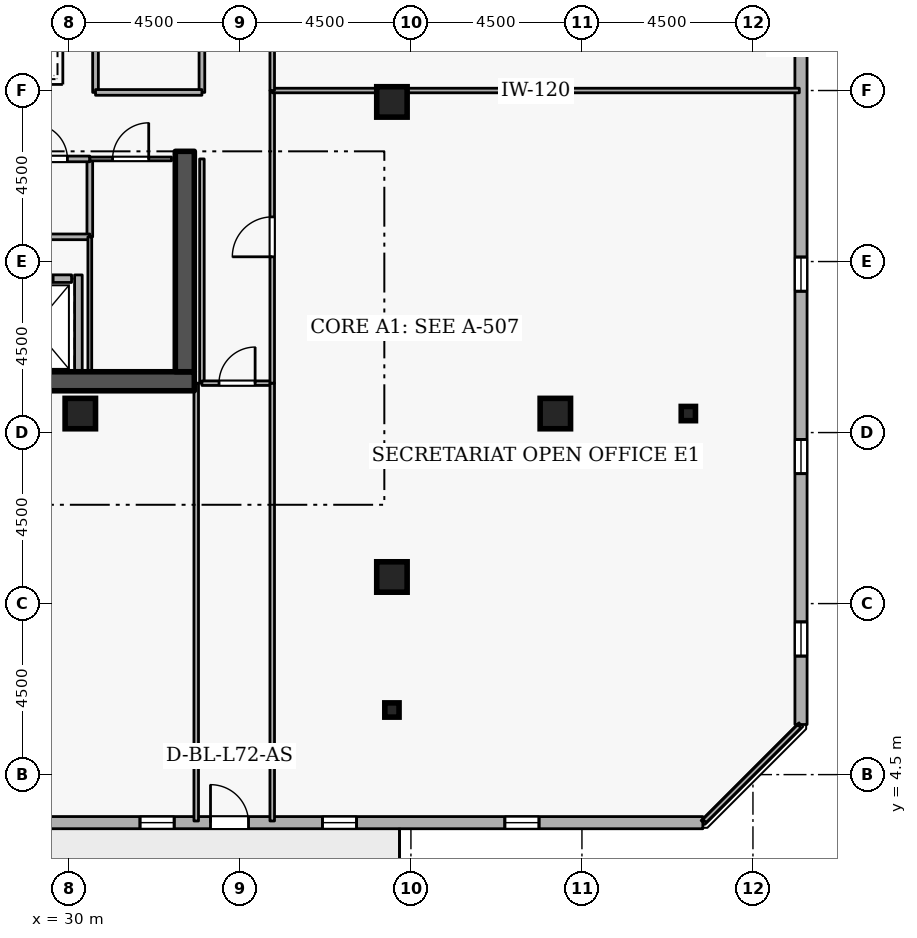
"""IFC4 building model, lengths in metres.
Left out: names, types, materials, properties, quantities, classifications, styles, units other than length and angle.
Written with IfcOpenShell. Run it as: python <this file> out.ifc"""

import sys

from ifc_helpers import new_model, si_unit, direction, frame, frame_2d, origin, origin_2d, place, context, subcontext, project, spatial, rectangle, i_section, extrude, element, fill, save


model = new_model("IFC4")
c1 = context("Model", 3, precision=1e-05, world=origin(), true_north=direction((0.0, 1.0)))
c2 = subcontext(c1, "Body", "Model", "MODEL_VIEW")
j1 = project(units=[si_unit("LENGTHUNIT", "METRE"), si_unit("PLANEANGLEUNIT", "RADIAN")], contexts=[c1])
p1 = place(None, origin())
s1 = spatial("IfcSite", under=j1, at=p1, CompositionType="ELEMENT")
p2 = place(p1, origin())
s2 = spatial("IfcBuilding", under=s1, at=p2, CompositionType="ELEMENT")
p3 = place(p2, frame((0.0, 0.0, 269.1)))
s3 = spatial("IfcBuildingStorey", under=s2, at=p3, CompositionType="ELEMENT", Elevation=269.1)
p4 = place(p3, frame((17.7, 14.85, 0.0), z_axis=(0.0, 0.0, 1.0), x_axis=(1.0, 0.0, 0.0)))
e1 = element("IfcWall", 1, at=p4, inside=s3, PredefinedType="SHEAR", context=c2, shape_type="SweptSolid", body=[
    extrude(rectangle(XDim=15.6, YDim=0.5, at=frame_2d((7.8, 0.0))), origin(), (0.0, 0.0, 1.0), 3.6),
])
p5 = place(p3, frame((33.05, 15.1, 0.0), z_axis=(0.0, 0.0, 1.0), x_axis=(0.0, 1.0, 0.0)))
e2 = element("IfcWall", 2, at=p5, inside=s3, PredefinedType="SHEAR", context=c2, shape_type="SweptSolid", body=[
    extrude(rectangle(XDim=5.8, YDim=0.5, at=frame_2d((2.9, 0.0))), origin(), (0.0, 0.0, 1.0), 3.6),
])
for number, where, z_axis, x_axis in (
    (3, (38.5, 9.7, 0.0), (0.0, 0.0, 1.0), (1.0, 0.0, 0.0)),
    (4, (42.8, 14.0, 0.0), (0.0, 0.0, 1.0), (1.0, 0.0, 0.0)),
    (5, (38.5, 22.2, 0.0), (0.0, 0.0, 1.0), (1.0, 0.0, 0.0)),
    (6, (30.3, 14.0, 0.0), (0.0, 0.0, 1.0), (1.0, 0.0, 0.0)),
):
    element("IfcColumn", number, at=place(p3, frame(where, z_axis=z_axis, x_axis=x_axis)), inside=s3, PredefinedType="COLUMN", context=c2, shape_type="SweptSolid", body=[
        extrude(rectangle(XDim=0.8, YDim=0.8, at=origin_2d()), origin(), (0.0, 0.0, 1.0), 3.6),
    ])
for number, where, z_axis, x_axis in (
    (7, (38.5, 6.2, 0.0), (0.0, 0.0, 1.0), (1.0, 0.0, 0.0)),
    (8, (46.3, 14.0, 0.0), (0.0, 0.0, 1.0), (1.0, 0.0, 0.0)),
):
    element("IfcColumn", number, at=place(p3, frame(where, z_axis=z_axis, x_axis=x_axis)), inside=s3, PredefinedType="COLUMN", context=c2, shape_type="SweptSolid", body=[
        extrude(i_section(OverallWidth=0.375, OverallDepth=0.375, WebThickness=0.017, FlangeThickness=0.027, FilletRadius=0.015, at=origin_2d()), origin(), (0.0, 0.0, 1.0), 3.6),
    ])
p6 = place(p3, frame((10.871, 3.237, 0.0), z_axis=(0.0, 0.0, 1.0), x_axis=(0.999999998513, -5.4540124e-05, 0.0)))
e9 = element("IfcWall", 9, at=p6, inside=s3, PredefinedType="STANDARD", context=c2, shape_type="SweptSolid", body=[
    extrude(rectangle(XDim=35.811, YDim=0.32, at=frame_2d((17.905, 0.0))), origin(), (0.0, 0.0, 1.0), 2.7),
])
p7 = place(p6, frame((22.855, 0.0, 0.0)))
e10 = element("IfcOpeningElement", 10, at=p7, cuts=e9, PredefinedType="OPENING", context=c2, shape_type="SweptSolid", body=[
    extrude(rectangle(XDim=1.0, YDim=2.08, at=frame_2d((0.5, 1.04))), frame((0.0, 0.17, 0.0), z_axis=(0.0, -1.0, 0.0), x_axis=(1.0, 0.0, 0.0)), (0.0, 0.0, 1.0), 0.34),
])
p8 = place(p6, frame((1.8, 0.0, 0.72)))
e11 = element("IfcOpeningElement", 11, at=p8, cuts=e9, PredefinedType="OPENING", context=c2, shape_type="SweptSolid", body=[
    extrude(rectangle(XDim=0.9, YDim=1.75, at=frame_2d((0.45, 0.875))), frame((0.0, 0.17, 0.0), z_axis=(0.0, -1.0, 0.0), x_axis=(1.0, 0.0, 0.0)), (0.0, 0.0, 1.0), 0.34),
])
p9 = place(p6, frame((6.6, 0.0, 0.72)))
e12 = element("IfcOpeningElement", 12, at=p9, cuts=e9, PredefinedType="OPENING", context=c2, shape_type="SweptSolid", body=[
    extrude(rectangle(XDim=0.9, YDim=1.75, at=frame_2d((0.45, 0.875))), frame((0.0, 0.17, 0.0), z_axis=(0.0, -1.0, 0.0), x_axis=(1.0, 0.0, 0.0)), (0.0, 0.0, 1.0), 0.34),
])
p10 = place(p6, frame((11.4, 0.0, 0.72)))
e13 = element("IfcOpeningElement", 13, at=p10, cuts=e9, PredefinedType="OPENING", context=c2, shape_type="SweptSolid", body=[
    extrude(rectangle(XDim=0.9, YDim=1.75, at=frame_2d((0.45, 0.875))), frame((0.0, 0.17, 0.0), z_axis=(0.0, -1.0, 0.0), x_axis=(1.0, 0.0, 0.0)), (0.0, 0.0, 1.0), 0.34),
])
p11 = place(p6, frame((16.2, 0.0, 0.72)))
e14 = element("IfcOpeningElement", 14, at=p11, cuts=e9, PredefinedType="OPENING", context=c2, shape_type="SweptSolid", body=[
    extrude(rectangle(XDim=0.9, YDim=1.75, at=frame_2d((0.45, 0.875))), frame((0.0, 0.17, 0.0), z_axis=(0.0, -1.0, 0.0), x_axis=(1.0, 0.0, 0.0)), (0.0, 0.0, 1.0), 0.34),
])
p12 = place(p6, frame((21.0, 0.0, 0.72)))
e15 = element("IfcOpeningElement", 15, at=p12, cuts=e9, PredefinedType="OPENING", context=c2, shape_type="SweptSolid", body=[
    extrude(rectangle(XDim=0.9, YDim=1.75, at=frame_2d((0.45, 0.875))), frame((0.0, 0.17, 0.0), z_axis=(0.0, -1.0, 0.0), x_axis=(1.0, 0.0, 0.0)), (0.0, 0.0, 1.0), 0.34),
])
p13 = place(p6, frame((25.8, 0.0, 0.72)))
e16 = element("IfcOpeningElement", 16, at=p13, cuts=e9, PredefinedType="OPENING", context=c2, shape_type="SweptSolid", body=[
    extrude(rectangle(XDim=0.9, YDim=1.75, at=frame_2d((0.45, 0.875))), frame((0.0, 0.17, 0.0), z_axis=(0.0, -1.0, 0.0), x_axis=(1.0, 0.0, 0.0)), (0.0, 0.0, 1.0), 0.34),
])
p14 = place(p6, frame((30.6, 0.0, 0.72)))
e17 = element("IfcOpeningElement", 17, at=p14, cuts=e9, PredefinedType="OPENING", context=c2, shape_type="SweptSolid", body=[
    extrude(rectangle(XDim=0.9, YDim=1.75, at=frame_2d((0.45, 0.875))), frame((0.0, 0.17, 0.0), z_axis=(0.0, -1.0, 0.0), x_axis=(1.0, 0.0, 0.0)), (0.0, 0.0, 1.0), 0.34),
])
p15 = place(p3, frame((49.265, 5.819, 0.0), z_axis=(0.0, 0.0, 1.0), x_axis=(-5.4540124e-05, 0.999999998513, 0.0)))
e18 = element("IfcWall", 18, at=p15, inside=s3, PredefinedType="STANDARD", context=c2, shape_type="SweptSolid", body=[
    extrude(rectangle(XDim=35.811, YDim=0.32, at=frame_2d((17.905, 0.0))), origin(), (0.0, 0.0, 1.0), 2.7),
])
p16 = place(p15, frame((1.8, 0.0, 0.72)))
e19 = element("IfcOpeningElement", 19, at=p16, cuts=e18, PredefinedType="OPENING", context=c2, shape_type="SweptSolid", body=[
    extrude(rectangle(XDim=0.9, YDim=1.75, at=frame_2d((0.45, 0.875))), frame((0.0, 0.17, 0.0), z_axis=(0.0, -1.0, 0.0), x_axis=(1.0, 0.0, 0.0)), (0.0, 0.0, 1.0), 0.34),
])
p17 = place(p15, frame((6.6, 0.0, 0.72)))
e20 = element("IfcOpeningElement", 20, at=p17, cuts=e18, PredefinedType="OPENING", context=c2, shape_type="SweptSolid", body=[
    extrude(rectangle(XDim=0.9, YDim=1.75, at=frame_2d((0.45, 0.875))), frame((0.0, 0.17, 0.0), z_axis=(0.0, -1.0, 0.0), x_axis=(1.0, 0.0, 0.0)), (0.0, 0.0, 1.0), 0.34),
])
p18 = place(p15, frame((11.4, 0.0, 0.72)))
e21 = element("IfcOpeningElement", 21, at=p18, cuts=e18, PredefinedType="OPENING", context=c2, shape_type="SweptSolid", body=[
    extrude(rectangle(XDim=0.9, YDim=1.75, at=frame_2d((0.45, 0.875))), frame((0.0, 0.17, 0.0), z_axis=(0.0, -1.0, 0.0), x_axis=(1.0, 0.0, 0.0)), (0.0, 0.0, 1.0), 0.34),
])
p19 = place(p15, frame((21.0, 0.0, 0.72)))
e22 = element("IfcOpeningElement", 22, at=p19, cuts=e18, PredefinedType="OPENING", context=c2, shape_type="SweptSolid", body=[
    extrude(rectangle(XDim=0.9, YDim=1.75, at=frame_2d((0.45, 0.875))), frame((0.0, 0.17, 0.0), z_axis=(0.0, -1.0, 0.0), x_axis=(1.0, 0.0, 0.0)), (0.0, 0.0, 1.0), 0.34),
])
p20 = place(p15, frame((25.8, 0.0, 0.72)))
e23 = element("IfcOpeningElement", 23, at=p20, cuts=e18, PredefinedType="OPENING", context=c2, shape_type="SweptSolid", body=[
    extrude(rectangle(XDim=0.9, YDim=1.75, at=frame_2d((0.45, 0.875))), frame((0.0, 0.17, 0.0), z_axis=(0.0, -1.0, 0.0), x_axis=(1.0, 0.0, 0.0)), (0.0, 0.0, 1.0), 0.34),
])
p21 = place(p15, frame((30.6, 0.0, 0.72)))
e24 = element("IfcOpeningElement", 24, at=p21, cuts=e18, PredefinedType="OPENING", context=c2, shape_type="SweptSolid", body=[
    extrude(rectangle(XDim=0.9, YDim=1.75, at=frame_2d((0.45, 0.875))), frame((0.0, 0.17, 0.0), z_axis=(0.0, -1.0, 0.0), x_axis=(1.0, 0.0, 0.0)), (0.0, 0.0, 1.0), 0.34),
])
p22 = place(p3, frame((28.08, 17.55, 0.0), z_axis=(0.0, 0.0, 1.0), x_axis=(1.0, 0.0, 0.0)))
e25 = element("IfcWall", 25, at=p22, inside=s3, PredefinedType="STANDARD", context=c2, shape_type="SweptSolid", body=[
    extrude(rectangle(XDim=1.99, YDim=0.2, at=frame_2d((0.995, 0.0))), origin(), (0.0, 0.0, 1.0), 3.34),
])
p23 = place(p22, frame((0.485, 0.0, 0.0)))
e26 = element("IfcOpeningElement", 26, at=p23, cuts=e25, PredefinedType="OPENING", context=c2, shape_type="SweptSolid", body=[
    extrude(rectangle(XDim=1.02, YDim=2.06, at=frame_2d((0.51, 1.03))), frame((0.0, 0.11, 0.0), z_axis=(0.0, -1.0, 0.0), x_axis=(1.0, 0.0, 0.0)), (0.0, 0.0, 1.0), 0.22),
])
p24 = place(p3, frame((30.25, 15.112, 0.0), z_axis=(0.0, 0.0, 1.0), x_axis=(0.0, 1.0, 0.0)))
e27 = element("IfcWall", 27, at=p24, inside=s3, PredefinedType="STANDARD", context=c2, shape_type="SweptSolid", body=[
    extrude(rectangle(XDim=2.536, YDim=0.2, at=frame_2d((1.268, 0.0))), origin(), (0.0, 0.0, 1.0), 3.34),
])
p25 = place(p3, frame((30.55, 20.7, 0.0), z_axis=(0.0, 0.0, 1.0), x_axis=(0.0, -1.0, 0.0)))
e28 = element("IfcWall", 28, at=p25, inside=s3, PredefinedType="PARTITIONING", context=c2, shape_type="SweptSolid", body=[
    extrude(rectangle(XDim=2.05, YDim=0.15, at=frame_2d((1.025, 0.0))), origin(), (0.0, 0.0, 1.0), 3.34),
])
p26 = place(p3, frame((30.55, 18.65, 0.0), z_axis=(0.0, 0.0, 1.0), x_axis=(-1.0, 0.0, 0.0)))
e29 = element("IfcWall", 29, at=p26, inside=s3, PredefinedType="PARTITIONING", context=c2, shape_type="SweptSolid", body=[
    extrude(rectangle(XDim=2.1, YDim=0.15, at=frame_2d((1.05, 0.0))), origin(), (0.0, 0.0, 1.0), 3.34),
])
p27 = place(p3, frame((28.45, 20.7, 0.0), z_axis=(0.0, 0.0, 1.0), x_axis=(1.0, 0.0, 0.0)))
e30 = element("IfcWall", 30, at=p27, inside=s3, PredefinedType="PARTITIONING", context=c2, shape_type="SweptSolid", body=[
    extrude(rectangle(XDim=2.1, YDim=0.15, at=frame_2d((1.05, 0.0))), origin(), (0.0, 0.0, 1.0), 3.34),
])
p28 = place(p27, frame((0.59, 0.0, 0.0)))
e31 = element("IfcOpeningElement", 31, at=p28, cuts=e30, PredefinedType="OPENING", context=c2, shape_type="SweptSolid", body=[
    extrude(rectangle(XDim=0.92, YDim=2.08, at=frame_2d((0.46, 1.04))), frame((0.0, 0.085, 0.0), z_axis=(0.0, -1.0, 0.0), x_axis=(1.0, 0.0, 0.0)), (0.0, 0.0, 1.0), 0.17),
])
p29 = place(p3, frame((30.55, 15.1, 0.0), z_axis=(0.0, 0.0, 1.0), x_axis=(0.0, 1.0, 0.0)))
e32 = element("IfcWall", 32, at=p29, inside=s3, PredefinedType="PARTITIONING", context=c2, shape_type="SweptSolid", body=[
    extrude(rectangle(XDim=3.55, YDim=0.1, at=frame_2d((1.775, 0.0))), origin(), (0.0, 0.0, 1.0), 3.34),
])
p30 = place(p3, frame((30.55, 20.7, 0.0), z_axis=(0.0, 0.0, 1.0), x_axis=(1.0, 0.0, 0.0)))
e33 = element("IfcWall", 33, at=p30, inside=s3, PredefinedType="PARTITIONING", context=c2, shape_type="SweptSolid", body=[
    extrude(rectangle(XDim=2.15, YDim=0.1, at=frame_2d((1.075, 0.0))), origin(), (0.0, 0.0, 1.0), 3.34),
])
p31 = place(p30, frame((0.6, 0.0, 0.0)))
e34 = element("IfcOpeningElement", 34, at=p31, cuts=e33, PredefinedType="OPENING", context=c2, shape_type="SweptSolid", body=[
    extrude(rectangle(XDim=0.95, YDim=2.1, at=frame_2d((0.475, 1.05))), frame((0.0, 0.06, 0.0), z_axis=(0.0, -1.0, 0.0), x_axis=(1.0, 0.0, 0.0)), (0.0, 0.0, 1.0), 0.12),
])
p32 = place(p3, frame((33.5, 20.7, 0.0), z_axis=(0.0, 0.0, 1.0), x_axis=(0.0, -1.0, 0.0)))
e35 = element("IfcWall", 35, at=p32, inside=s3, PredefinedType="PARTITIONING", context=c2, shape_type="SweptSolid", body=[
    extrude(rectangle(XDim=5.9, YDim=0.12, at=frame_2d((2.95, 0.0))), origin(), (0.0, 0.0, 1.0), 3.34),
])
p33 = place(p3, frame((33.5, 14.8, 0.0), z_axis=(0.0, 0.0, 1.0), x_axis=(1.0, 0.0, 0.0)))
e36 = element("IfcWall", 36, at=p33, inside=s3, PredefinedType="PARTITIONING", context=c2, shape_type="SweptSolid", body=[
    extrude(rectangle(XDim=1.85, YDim=0.12, at=frame_2d((0.925, 0.0))), origin(), (0.0, 0.0, 1.0), 3.34),
])
p34 = place(p33, frame((0.45, 0.0, 0.0)))
e37 = element("IfcOpeningElement", 37, at=p34, cuts=e36, PredefinedType="OPENING", context=c2, shape_type="SweptSolid", body=[
    extrude(rectangle(XDim=0.95, YDim=2.1, at=frame_2d((0.475, 1.05))), frame((0.0, 0.07, 0.0), z_axis=(0.0, -1.0, 0.0), x_axis=(1.0, 0.0, 0.0)), (0.0, 0.0, 1.0), 0.14),
])
for number, where, z_axis, x_axis in (
    (38, (35.35, 14.8, 0.0), (0.0, 0.0, 1.0), (0.0, -1.0, 0.0)),
    (39, (33.35, 3.28, 0.0), (0.0, 0.0, 1.0), (0.0, 1.0, 0.0)),
):
    element("IfcWall", number, at=place(p3, frame(where, z_axis=z_axis, x_axis=x_axis)), inside=s3, PredefinedType="PARTITIONING", context=c2, shape_type="SweptSolid", body=[
        extrude(rectangle(XDim=11.52, YDim=0.12, at=frame_2d((5.76, 0.0))), origin(), (0.0, 0.0, 1.0), 3.34),
    ])
p35 = place(p3, frame((35.35, 14.8, 0.0), z_axis=(0.0, 0.0, 1.0), x_axis=(0.0, 1.0, 0.0)))
e40 = element("IfcWall", 40, at=p35, inside=s3, PredefinedType="PARTITIONING", context=c2, shape_type="SweptSolid", body=[
    extrude(rectangle(XDim=7.7, YDim=0.12, at=frame_2d((3.85, 0.0))), origin(), (0.0, 0.0, 1.0), 3.34),
])
p36 = place(p35, frame((3.325, 0.0, 0.0)))
e41 = element("IfcOpeningElement", 41, at=p36, cuts=e40, PredefinedType="OPENING", context=c2, shape_type="SweptSolid", body=[
    extrude(rectangle(XDim=1.05, YDim=2.1, at=frame_2d((0.525, 1.05))), frame((0.0, 0.07, 0.0), z_axis=(0.0, -1.0, 0.0), x_axis=(1.0, 0.0, 0.0)), (0.0, 0.0, 1.0), 0.14),
])
p37 = place(p3, frame((35.35, 22.5, 0.0), z_axis=(0.0, 0.0, 1.0), x_axis=(1.0, 0.0, 0.0)))
e42 = element("IfcWall", 42, at=p37, inside=s3, PredefinedType="PARTITIONING", context=c2, shape_type="SweptSolid", body=[
    extrude(rectangle(XDim=13.87, YDim=0.12, at=frame_2d((6.935, 0.0))), origin(), (0.0, 0.0, 1.0), 3.34),
])
p38 = place(p3, frame((49.22, 5.775, 0.0), z_axis=(0.0, 0.0, 1.0), x_axis=(-0.707106781187, -0.707106781187, 0.0)))
e43 = element("IfcWall", 43, at=p38, inside=s3, PredefinedType="PARTITIONING", context=c2, shape_type="SweptSolid", body=[
    extrude(rectangle(XDim=3.528, YDim=0.12, at=frame_2d((1.764, 0.0))), origin(), (0.0, 0.0, 1.0), 3.34),
])
p39 = place(p3, frame((35.35, 22.5, 0.0), z_axis=(0.0, 0.0, 1.0), x_axis=(0.0, 1.0, 0.0)))
e44 = element("IfcWall", 44, at=p39, inside=s3, PredefinedType="PARTITIONING", context=c2, shape_type="SweptSolid", body=[
    extrude(rectangle(XDim=6.3, YDim=0.12, at=frame_2d((3.15, 0.0))), origin(), (0.0, 0.0, 1.0), 3.34),
])
p40 = place(p39, frame((2.625, 0.0, 0.0)))
e45 = element("IfcOpeningElement", 45, at=p40, cuts=e44, PredefinedType="OPENING", context=c2, shape_type="SweptSolid", body=[
    extrude(rectangle(XDim=1.05, YDim=2.1, at=frame_2d((0.525, 1.05))), frame((0.0, 0.07, 0.0), z_axis=(0.0, -1.0, 0.0), x_axis=(1.0, 0.0, 0.0)), (0.0, 0.0, 1.0), 0.14),
])
p41 = place(p3, frame((30.7, 22.45, 0.0), z_axis=(0.0, 0.0, 1.0), x_axis=(0.0, 1.0, 0.0)))
e46 = element("IfcWall", 46, at=p41, inside=s3, PredefinedType="PARTITIONING", context=c2, shape_type="SweptSolid", body=[
    extrude(rectangle(XDim=4.55, YDim=0.15, at=frame_2d((2.275, 0.0))), origin(), (0.0, 0.0, 1.0), 3.34),
])
p42 = place(p3, frame((33.5, 27.0, 0.0), z_axis=(0.0, 0.0, 1.0), x_axis=(0.0, -1.0, 0.0)))
e47 = element("IfcWall", 47, at=p42, inside=s3, PredefinedType="PARTITIONING", context=c2, shape_type="SweptSolid", body=[
    extrude(rectangle(XDim=4.55, YDim=0.15, at=frame_2d((2.275, 0.0))), origin(), (0.0, 0.0, 1.0), 3.34),
])
p43 = place(p42, frame((1.625, 0.0, 0.0)))
e48 = element("IfcOpeningElement", 48, at=p43, cuts=e47, PredefinedType="OPENING", context=c2, shape_type="SweptSolid", body=[
    extrude(rectangle(XDim=1.3, YDim=2.12, at=frame_2d((0.65, 1.06))), frame((0.0, 0.085, 0.0), z_axis=(0.0, -1.0, 0.0), x_axis=(1.0, 0.0, 0.0)), (0.0, 0.0, 1.0), 0.17),
])
p44 = place(p3, frame((33.5, 22.45, 0.0), z_axis=(0.0, 0.0, 1.0), x_axis=(-1.0, 0.0, 0.0)))
e49 = element("IfcWall", 49, at=p44, inside=s3, PredefinedType="PARTITIONING", context=c2, shape_type="SweptSolid", body=[
    extrude(rectangle(XDim=2.8, YDim=0.15, at=frame_2d((1.4, 0.0))), origin(), (0.0, 0.0, 1.0), 3.34),
])
p45 = place(p7, origin())
e50 = element("IfcDoor", 50, at=p45, inside=s3, OperationType="SINGLE_SWING_LEFT", PredefinedType="DOOR", context=c2, shape_type="SweptSolid", body=[
    extrude(rectangle(XDim=1.0, YDim=2.08, at=frame_2d((0.5, 1.04))), frame((0.0, 0.025, 0.0), z_axis=(0.0, -1.0, 0.0), x_axis=(1.0, 0.0, 0.0)), (0.0, 0.0, 1.0), 0.05),
])
fill(e10, e50)
p46 = place(p12, origin())
e51 = element("IfcWindow", 51, at=p46, inside=s3, PartitioningType="SINGLE_PANEL", PredefinedType="WINDOW", context=c2, shape_type="SweptSolid", body=[
    extrude(rectangle(XDim=0.9, YDim=1.75, at=frame_2d((0.45, 0.875))), frame((0.0, 0.03, 0.0), z_axis=(0.0, -1.0, 0.0), x_axis=(1.0, 0.0, 0.0)), (0.0, 0.0, 1.0), 0.06),
])
fill(e15, e51)
p47 = place(p13, origin())
e52 = element("IfcWindow", 52, at=p47, inside=s3, PartitioningType="SINGLE_PANEL", PredefinedType="WINDOW", context=c2, shape_type="SweptSolid", body=[
    extrude(rectangle(XDim=0.9, YDim=1.75, at=frame_2d((0.45, 0.875))), frame((0.0, 0.03, 0.0), z_axis=(0.0, -1.0, 0.0), x_axis=(1.0, 0.0, 0.0)), (0.0, 0.0, 1.0), 0.06),
])
fill(e16, e52)
p48 = place(p14, origin())
e53 = element("IfcWindow", 53, at=p48, inside=s3, PartitioningType="SINGLE_PANEL", PredefinedType="WINDOW", context=c2, shape_type="SweptSolid", body=[
    extrude(rectangle(XDim=0.9, YDim=1.75, at=frame_2d((0.45, 0.875))), frame((0.0, 0.03, 0.0), z_axis=(0.0, -1.0, 0.0), x_axis=(1.0, 0.0, 0.0)), (0.0, 0.0, 1.0), 0.06),
])
fill(e17, e53)
p49 = place(p16, origin())
e54 = element("IfcWindow", 54, at=p49, inside=s3, PartitioningType="SINGLE_PANEL", PredefinedType="WINDOW", context=c2, shape_type="SweptSolid", body=[
    extrude(rectangle(XDim=0.9, YDim=1.75, at=frame_2d((0.45, 0.875))), frame((0.0, 0.03, 0.0), z_axis=(0.0, -1.0, 0.0), x_axis=(1.0, 0.0, 0.0)), (0.0, 0.0, 1.0), 0.06),
])
fill(e19, e54)
p50 = place(p17, origin())
e55 = element("IfcWindow", 55, at=p50, inside=s3, PartitioningType="SINGLE_PANEL", PredefinedType="WINDOW", context=c2, shape_type="SweptSolid", body=[
    extrude(rectangle(XDim=0.9, YDim=1.75, at=frame_2d((0.45, 0.875))), frame((0.0, 0.03, 0.0), z_axis=(0.0, -1.0, 0.0), x_axis=(1.0, 0.0, 0.0)), (0.0, 0.0, 1.0), 0.06),
])
fill(e20, e55)
p51 = place(p18, origin())
e56 = element("IfcWindow", 56, at=p51, inside=s3, PartitioningType="SINGLE_PANEL", PredefinedType="WINDOW", context=c2, shape_type="SweptSolid", body=[
    extrude(rectangle(XDim=0.9, YDim=1.75, at=frame_2d((0.45, 0.875))), frame((0.0, 0.03, 0.0), z_axis=(0.0, -1.0, 0.0), x_axis=(1.0, 0.0, 0.0)), (0.0, 0.0, 1.0), 0.06),
])
fill(e21, e56)
p52 = place(p23, origin())
e57 = element("IfcDoor", 57, at=p52, inside=s3, OperationType="SLIDING_TO_LEFT", PredefinedType="DOOR", context=c2, shape_type="SweptSolid", body=[
    extrude(rectangle(XDim=1.02, YDim=2.06, at=frame_2d((0.51, 1.03))), frame((0.0, 0.025, 0.0), z_axis=(0.0, -1.0, 0.0), x_axis=(1.0, 0.0, 0.0)), (0.0, 0.0, 1.0), 0.05),
])
fill(e26, e57)
p53 = place(p28, origin())
e58 = element("IfcDoor", 58, at=p53, inside=s3, OperationType="SINGLE_SWING_LEFT", PredefinedType="DOOR", context=c2, shape_type="SweptSolid", body=[
    extrude(rectangle(XDim=0.92, YDim=2.08, at=frame_2d((0.46, 1.04))), frame((0.0, 0.025, 0.0), z_axis=(0.0, -1.0, 0.0), x_axis=(1.0, 0.0, 0.0)), (0.0, 0.0, 1.0), 0.05),
])
fill(e31, e58)
p54 = place(p31, origin())
e59 = element("IfcDoor", 59, at=p54, inside=s3, OperationType="SINGLE_SWING_RIGHT", PredefinedType="DOOR", context=c2, shape_type="SweptSolid", body=[
    extrude(rectangle(XDim=0.95, YDim=2.1, at=frame_2d((0.475, 1.05))), frame((0.0, 0.025, 0.0), z_axis=(0.0, -1.0, 0.0), x_axis=(1.0, 0.0, 0.0)), (0.0, 0.0, 1.0), 0.05),
])
fill(e34, e59)
p55 = place(p34, origin())
e60 = element("IfcDoor", 60, at=p55, inside=s3, OperationType="SINGLE_SWING_RIGHT", PredefinedType="DOOR", context=c2, shape_type="SweptSolid", body=[
    extrude(rectangle(XDim=0.95, YDim=2.1, at=frame_2d((0.475, 1.05))), frame((0.0, 0.025, 0.0), z_axis=(0.0, -1.0, 0.0), x_axis=(1.0, 0.0, 0.0)), (0.0, 0.0, 1.0), 0.05),
])
fill(e37, e60)
p56 = place(p36, origin())
e61 = element("IfcDoor", 61, at=p56, inside=s3, OperationType="SINGLE_SWING_LEFT", PredefinedType="DOOR", context=c2, shape_type="SweptSolid", body=[
    extrude(rectangle(XDim=1.05, YDim=2.1, at=frame_2d((0.525, 1.05))), frame((0.0, 0.025, 0.0), z_axis=(0.0, -1.0, 0.0), x_axis=(1.0, 0.0, 0.0)), (0.0, 0.0, 1.0), 0.05),
])
fill(e41, e61)
save(model, sys.argv[1])
